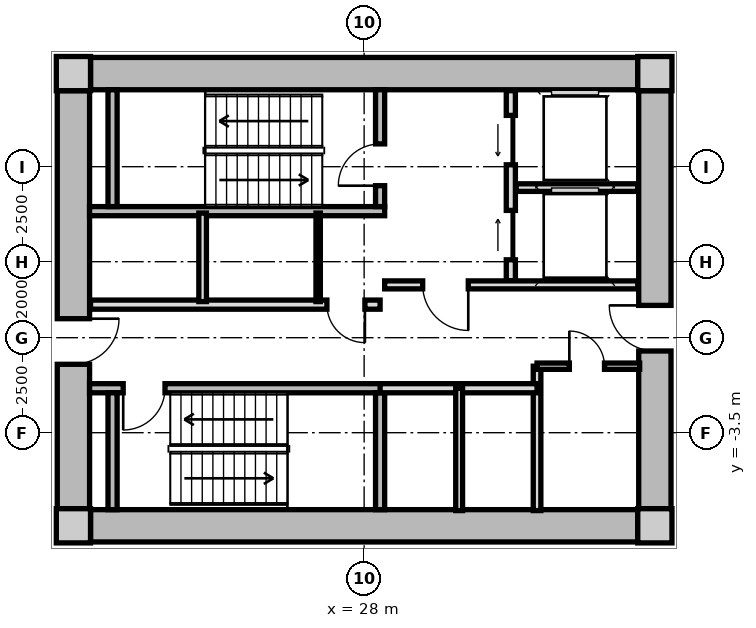
"""IFC4 building model, lengths in metres.
Left out: names, types, materials, properties, quantities, classifications, styles, units other than length and angle.
Written with IfcOpenShell. Run it as: python <this file> out.ifc"""

import sys

from ifc_helpers import new_model, si_unit, direction, frame, frame_2d, origin, origin_2d, place, context, subcontext, project, spatial, rectangle, extrude, source, transform, mapped, element, fill, save


model = new_model("IFC4")
c1 = context("Model", 3, precision=1e-05, world=origin(), true_north=direction((0.0, 1.0)))
c2 = subcontext(c1, "Body", "Model", "MODEL_VIEW")
j1 = project(units=[si_unit("LENGTHUNIT", "METRE"), si_unit("PLANEANGLEUNIT", "RADIAN")], contexts=[c1])
p1 = place(None, origin())
s1 = spatial("IfcSite", under=j1, at=p1, CompositionType="ELEMENT")
p2 = place(p1, origin())
s2 = spatial("IfcBuilding", under=s1, at=p2, CompositionType="ELEMENT")
p3 = place(p2, frame((0.0, 0.0, -8.4)))
s3 = spatial("IfcBuildingStorey", under=s2, at=p3, CompositionType="ELEMENT", Elevation=-8.4)
m1 = source(origin(), c2, "Body", "SweptSolid", [
    extrude(rectangle(XDim=0.9, YDim=0.9, at=origin_2d()), origin(), (0.0, 0.0, 1.0), 4.2),
])
for number, where, z_axis, x_axis in (
    (1, (20.35, -5.95, 0.0), (0.0, 0.0, 1.0), (1.0, 0.0, 0.0)),
    (2, (35.65, -5.95, 0.0), (0.0, 0.0, 1.0), (1.0, 0.0, 0.0)),
    (3, (35.65, 5.95, 0.0), (0.0, 0.0, 1.0), (1.0, 0.0, 0.0)),
    (4, (20.35, 5.95, 0.0), (0.0, 0.0, 1.0), (1.0, 0.0, 0.0)),
):
    element("IfcColumn", number, at=place(p3, frame(where, z_axis=z_axis, x_axis=x_axis)), inside=s3, PredefinedType="COLUMN", context=c2, shape_type="MappedRepresentation", body=[
        mapped(m1, transform((0.0, 0.0, 0.0), x_axis=(1.0, 0.0, 0.0), y_axis=(0.0, 1.0, 0.0), z_axis=(0.0, 0.0, 1.0), scale=1.0)),
    ])
m2 = source(origin(), c2, "Body", "SweptSolid", [
    extrude(rectangle(XDim=14.4, YDim=0.85, at=frame_2d((7.2, 0.0))), origin(), (0.0, 0.0, 1.0), 3.88),
])
for number, where, z_axis, x_axis in (
    (5, (20.8, 5.95, 0.0), (0.0, 0.0, 1.0), (1.0, 0.0, 0.0)),
    (6, (35.2, -5.95, 0.0), (0.0, 0.0, 1.0), (-1.0, 0.0, 0.0)),
):
    element("IfcWall", number, at=place(p3, frame(where, z_axis=z_axis, x_axis=x_axis)), inside=s3, PredefinedType="SHEAR", context=c2, shape_type="MappedRepresentation", body=[
        mapped(m2, transform((0.0, 0.0, 0.0), x_axis=(1.0, 0.0, 0.0), y_axis=(0.0, 1.0, 0.0), z_axis=(0.0, 0.0, 1.0), scale=1.0)),
    ])
m3 = source(origin(), c2, "Body", "SweptSolid", [
    extrude(rectangle(XDim=11.0, YDim=0.85, at=frame_2d((5.5, 0.0))), origin(), (0.0, 0.0, 1.0), 3.88),
])
p4 = place(p3, frame((20.35, -5.5, 0.0), z_axis=(0.0, 0.0, 1.0), x_axis=(0.0, 1.0, 0.0)))
e7 = element("IfcWall", 7, at=p4, inside=s3, PredefinedType="SHEAR", context=c2, shape_type="MappedRepresentation", body=[
    mapped(m3, transform((0.0, 0.0, 0.0), x_axis=(1.0, 0.0, 0.0), y_axis=(0.0, 1.0, 0.0), z_axis=(0.0, 0.0, 1.0), scale=1.0)),
])
p5 = place(p4, frame((3.8, 0.0, 0.0)))
e8 = element("IfcOpeningElement", 8, at=p5, cuts=e7, PredefinedType="OPENING", context=c2, shape_type="SweptSolid", body=[
    extrude(rectangle(XDim=1.2, YDim=2.15, at=frame_2d((0.6, 1.075))), frame((0.0, 0.435, 0.0), z_axis=(0.0, -1.0, 0.0), x_axis=(1.0, 0.0, 0.0)), (0.0, 0.0, 1.0), 0.87),
])
p6 = place(p3, frame((35.65, 5.5, 0.0), z_axis=(0.0, 0.0, 1.0), x_axis=(0.0, -1.0, 0.0)))
e9 = element("IfcWall", 9, at=p6, inside=s3, PredefinedType="SHEAR", context=c2, shape_type="MappedRepresentation", body=[
    mapped(m3, transform((0.0, 0.0, 0.0), x_axis=(1.0, 0.0, 0.0), y_axis=(0.0, 1.0, 0.0), z_axis=(0.0, 0.0, 1.0), scale=1.0)),
])
p7 = place(p6, frame((5.65, 0.0, 0.0)))
e10 = element("IfcOpeningElement", 10, at=p7, cuts=e9, PredefinedType="OPENING", context=c2, shape_type="SweptSolid", body=[
    extrude(rectangle(XDim=1.2, YDim=2.15, at=frame_2d((0.6, 1.075))), frame((0.0, 0.435, 0.0), z_axis=(0.0, -1.0, 0.0), x_axis=(1.0, 0.0, 0.0)), (0.0, 0.0, 1.0), 0.87),
])
m4 = source(origin(), c2, "Body", "SweptSolid", [
    extrude(rectangle(XDim=7.765, YDim=0.24, at=frame_2d((3.883, 0.0))), origin(), (0.0, 0.0, 1.0), 3.88),
])
p8 = place(p3, frame((20.775, 2.33, 0.0), z_axis=(0.0, 0.0, 1.0), x_axis=(1.0, 0.0, 0.0)))
e11 = element("IfcWall", 11, at=p8, inside=s3, PredefinedType="PARTITIONING", context=c2, shape_type="MappedRepresentation", body=[
    mapped(m4, transform((0.0, 0.0, 0.0), x_axis=(1.0, 0.0, 0.0), y_axis=(0.0, 1.0, 0.0), z_axis=(0.0, 0.0, 1.0), scale=1.0)),
])
m5 = source(origin(), c2, "Body", "SweptSolid", [
    extrude(rectangle(XDim=3.075, YDim=0.24, at=frame_2d((1.538, 0.0))), origin(), (0.0, 0.0, 1.0), 3.88),
])
p9 = place(p3, frame((21.38, 2.45, 0.0), z_axis=(0.0, 0.0, 1.0), x_axis=(0.0, 1.0, 0.0)))
e12 = element("IfcWall", 12, at=p9, inside=s3, PredefinedType="PARTITIONING", context=c2, shape_type="MappedRepresentation", body=[
    mapped(m5, transform((0.0, 0.0, 0.0), x_axis=(1.0, 0.0, 0.0), y_axis=(0.0, 1.0, 0.0), z_axis=(0.0, 0.0, 1.0), scale=1.0)),
])
p10 = place(p3, frame((28.42, 2.45, 0.0), z_axis=(0.0, 0.0, 1.0), x_axis=(0.0, 1.0, 0.0)))
e13 = element("IfcWall", 13, at=p10, inside=s3, PredefinedType="PARTITIONING", context=c2, shape_type="MappedRepresentation", body=[
    mapped(m5, transform((0.0, 0.0, 0.0), x_axis=(1.0, 0.0, 0.0), y_axis=(0.0, 1.0, 0.0), z_axis=(0.0, 0.0, 1.0), scale=1.0)),
])
p11 = place(p10, frame((0.55, 0.0, 0.0)))
e14 = element("IfcOpeningElement", 14, at=p11, cuts=e13, PredefinedType="OPENING", context=c2, shape_type="SweptSolid", body=[
    extrude(rectangle(XDim=1.1, YDim=2.15, at=frame_2d((0.55, 1.075))), frame((0.0, 0.13, 0.0), z_axis=(0.0, -1.0, 0.0), x_axis=(1.0, 0.0, 0.0)), (0.0, 0.0, 1.0), 0.26),
])
p12 = place(p3, frame((20.775, -2.33, 0.0), z_axis=(0.0, 0.0, 1.0), x_axis=(1.0, 0.0, 0.0)))
e15 = element("IfcWall", 15, at=p12, inside=s3, PredefinedType="PARTITIONING", context=c2, shape_type="MappedRepresentation", body=[
    mapped(m4, transform((0.0, 0.0, 0.0), x_axis=(1.0, 0.0, 0.0), y_axis=(0.0, 1.0, 0.0), z_axis=(0.0, 0.0, 1.0), scale=1.0)),
])
p13 = place(p12, frame((0.885, 0.0, 0.0)))
e16 = element("IfcOpeningElement", 16, at=p13, cuts=e15, PredefinedType="OPENING", context=c2, shape_type="SweptSolid", body=[
    extrude(rectangle(XDim=1.1, YDim=2.15, at=frame_2d((0.55, 1.075))), frame((0.0, 0.13, 0.0), z_axis=(0.0, -1.0, 0.0), x_axis=(1.0, 0.0, 0.0)), (0.0, 0.0, 1.0), 0.26),
])
for number, where, z_axis, x_axis in (
    (17, (21.38, -5.525, 0.0), (0.0, 0.0, 1.0), (0.0, 1.0, 0.0)),
    (18, (28.42, -5.525, 0.0), (0.0, 0.0, 1.0), (0.0, 1.0, 0.0)),
):
    element("IfcWall", number, at=place(p3, frame(where, z_axis=z_axis, x_axis=x_axis)), inside=s3, PredefinedType="PARTITIONING", context=c2, shape_type="MappedRepresentation", body=[
        mapped(m5, transform((0.0, 0.0, 0.0), x_axis=(1.0, 0.0, 0.0), y_axis=(0.0, 1.0, 0.0), z_axis=(0.0, 0.0, 1.0), scale=1.0)),
    ])
m6 = source(origin(), c2, "Body", "SweptSolid", [
    extrude(rectangle(XDim=5.0, YDim=0.24, at=frame_2d((2.5, 0.0))), origin(), (0.0, 0.0, 1.0), 3.865),
])
p14 = place(p3, frame((31.86, 0.5, 0.0), z_axis=(0.0, 0.0, 1.0), x_axis=(0.0, 1.0, 0.0)))
e19 = element("IfcWall", 19, at=p14, inside=s3, PredefinedType="PARTITIONING", context=c2, shape_type="MappedRepresentation", body=[
    mapped(m6, transform((0.0, 0.0, 0.0), x_axis=(1.0, 0.0, 0.0), y_axis=(0.0, 1.0, 0.0), z_axis=(0.0, 0.0, 1.0), scale=1.0)),
])
p15 = place(p14, frame((3.05, 0.0, 0.0)))
e20 = element("IfcOpeningElement", 20, at=p15, cuts=e19, PredefinedType="OPENING", context=c2, shape_type="SweptSolid", body=[
    extrude(rectangle(XDim=1.3, YDim=2.2, at=frame_2d((0.65, 1.1))), frame((0.0, 0.13, 0.0), z_axis=(0.0, -1.0, 0.0), x_axis=(1.0, 0.0, 0.0)), (0.0, 0.0, 1.0), 0.26),
])
p16 = place(p14, frame((0.55, 0.0, 0.0)))
e21 = element("IfcOpeningElement", 21, at=p16, cuts=e19, PredefinedType="OPENING", context=c2, shape_type="SweptSolid", body=[
    extrude(rectangle(XDim=1.3, YDim=2.2, at=frame_2d((0.65, 1.1))), frame((0.0, 0.13, 0.0), z_axis=(0.0, -1.0, 0.0), x_axis=(1.0, 0.0, 0.0)), (0.0, 0.0, 1.0), 0.26),
])
m7 = source(origin(), c2, "Body", "SweptSolid", [
    extrude(rectangle(XDim=3.2, YDim=0.2, at=frame_2d((1.6, 0.0))), origin(), (0.0, 0.0, 1.0), 3.865),
])
p17 = place(p3, frame((32.0, 2.95, 0.0), z_axis=(0.0, 0.0, 1.0), x_axis=(1.0, 0.0, 0.0)))
e22 = element("IfcWall", 22, at=p17, inside=s3, PredefinedType="PARTITIONING", context=c2, shape_type="MappedRepresentation", body=[
    mapped(m7, transform((0.0, 0.0, 0.0), x_axis=(1.0, 0.0, 0.0), y_axis=(0.0, 1.0, 0.0), z_axis=(0.0, 0.0, 1.0), scale=1.0)),
])
m8 = source(origin(), c2, "Body", "SweptSolid", [
    extrude(rectangle(XDim=6.66, YDim=0.21, at=frame_2d((3.33, 0.0))), origin(), (0.0, 0.0, 1.0), 3.865),
])
p18 = place(p3, frame((28.54, 0.39, 0.0), z_axis=(0.0, 0.0, 1.0), x_axis=(1.0, 0.0, 0.0)))
e23 = element("IfcWall", 23, at=p18, inside=s3, PredefinedType="PARTITIONING", context=c2, shape_type="MappedRepresentation", body=[
    mapped(m8, transform((0.0, 0.0, 0.0), x_axis=(1.0, 0.0, 0.0), y_axis=(0.0, 1.0, 0.0), z_axis=(0.0, 0.0, 1.0), scale=1.0)),
])
p19 = place(p18, frame((1.0, 0.0, 0.0)))
e24 = element("IfcOpeningElement", 24, at=p19, cuts=e23, PredefinedType="OPENING", context=c2, shape_type="SweptSolid", body=[
    extrude(rectangle(XDim=1.2, YDim=2.15, at=frame_2d((0.6, 1.075))), frame((0.0, 0.115, 0.0), z_axis=(0.0, -1.0, 0.0), x_axis=(1.0, 0.0, 0.0)), (0.0, 0.0, 1.0), 0.23),
])
m9 = source(origin(), c2, "Body", "SweptSolid", [
    extrude(rectangle(XDim=7.62, YDim=0.24, at=frame_2d((3.81, 0.0))), origin(), (0.0, 0.0, 1.0), 3.865),
])
p20 = place(p3, frame((20.8, -0.13, 0.0), z_axis=(0.0, 0.0, 1.0), x_axis=(1.0, 0.0, 0.0)))
e25 = element("IfcWall", 25, at=p20, inside=s3, PredefinedType="PARTITIONING", context=c2, shape_type="MappedRepresentation", body=[
    mapped(m9, transform((0.0, 0.0, 0.0), x_axis=(1.0, 0.0, 0.0), y_axis=(0.0, 1.0, 0.0), z_axis=(0.0, 0.0, 1.0), scale=1.0)),
])
p21 = place(p20, frame((6.22, 0.0, 0.0)))
e26 = element("IfcOpeningElement", 26, at=p21, cuts=e25, PredefinedType="OPENING", context=c2, shape_type="SweptSolid", body=[
    extrude(rectangle(XDim=1.0, YDim=2.1, at=frame_2d((0.5, 1.05))), frame((0.0, 0.13, 0.0), z_axis=(0.0, -1.0, 0.0), x_axis=(1.0, 0.0, 0.0)), (0.0, 0.0, 1.0), 0.26),
])
m10 = source(origin(), c2, "Body", "SweptSolid", [
    extrude(rectangle(XDim=2.33, YDim=0.115, at=frame_2d((1.165, 0.0))), origin(), (0.0, 0.0, 1.0), 3.865),
])
p22 = place(p3, frame((26.79, -0.05, 0.0), z_axis=(0.0, 0.0, 1.0), x_axis=(0.0, 1.0, 0.0)))
e27 = element("IfcWall", 27, at=p22, inside=s3, PredefinedType="PARTITIONING", context=c2, shape_type="MappedRepresentation", body=[
    mapped(m10, transform((0.0, 0.0, 0.0), x_axis=(1.0, 0.0, 0.0), y_axis=(0.0, 1.0, 0.0), z_axis=(0.0, 0.0, 1.0), scale=1.0)),
])
m11 = source(origin(), c2, "Body", "SweptSolid", [
    extrude(rectangle(XDim=2.33, YDim=0.2, at=frame_2d((1.165, 0.0))), origin(), (0.0, 0.0, 1.0), 3.865),
])
p23 = place(p3, frame((23.75, -0.05, 0.0), z_axis=(0.0, 0.0, 1.0), x_axis=(0.0, 1.0, 0.0)))
e28 = element("IfcWall", 28, at=p23, inside=s3, PredefinedType="PARTITIONING", context=c2, shape_type="MappedRepresentation", body=[
    mapped(m11, transform((0.0, 0.0, 0.0), x_axis=(1.0, 0.0, 0.0), y_axis=(0.0, 1.0, 0.0), z_axis=(0.0, 0.0, 1.0), scale=1.0)),
])
m12 = source(origin(), c2, "Body", "SweptSolid", [
    extrude(rectangle(XDim=3.8, YDim=0.2, at=frame_2d((1.9, 0.0))), origin(), (0.0, 0.0, 1.0), 3.865),
])
p24 = place(p3, frame((32.55, -5.55, 0.0), z_axis=(0.0, 0.0, 1.0), x_axis=(0.0, 1.0, 0.0)))
e29 = element("IfcWall", 29, at=p24, inside=s3, PredefinedType="PARTITIONING", context=c2, shape_type="MappedRepresentation", body=[
    mapped(m12, transform((0.0, 0.0, 0.0), x_axis=(1.0, 0.0, 0.0), y_axis=(0.0, 1.0, 0.0), z_axis=(0.0, 0.0, 1.0), scale=1.0)),
])
m13 = source(origin(), c2, "Body", "SweptSolid", [
    extrude(rectangle(XDim=4.13, YDim=0.24, at=frame_2d((2.065, 0.0))), origin(), (0.0, 0.0, 1.0), 3.865),
])
p25 = place(p3, frame((28.42, -2.33, 0.0), z_axis=(0.0, 0.0, 1.0), x_axis=(1.0, 0.0, 0.0)))
e30 = element("IfcWall", 30, at=p25, inside=s3, PredefinedType="PARTITIONING", context=c2, shape_type="MappedRepresentation", body=[
    mapped(m13, transform((0.0, 0.0, 0.0), x_axis=(1.0, 0.0, 0.0), y_axis=(0.0, 1.0, 0.0), z_axis=(0.0, 0.0, 1.0), scale=1.0)),
])
m14 = source(origin(), c2, "Body", "SweptSolid", [
    extrude(rectangle(XDim=3.22, YDim=0.18, at=frame_2d((1.61, 0.0))), origin(), (0.0, 0.0, 1.0), 3.865),
])
p26 = place(p3, frame((30.5, -5.55, 0.0), z_axis=(0.0, 0.0, 1.0), x_axis=(0.0, 1.0, 0.0)))
e31 = element("IfcWall", 31, at=p26, inside=s3, PredefinedType="PARTITIONING", context=c2, shape_type="MappedRepresentation", body=[
    mapped(m14, transform((0.0, 0.0, 0.0), x_axis=(1.0, 0.0, 0.0), y_axis=(0.0, 1.0, 0.0), z_axis=(0.0, 0.0, 1.0), scale=1.0)),
])
m15 = source(origin(), c2, "Body", "SweptSolid", [
    extrude(rectangle(XDim=2.7, YDim=0.165, at=frame_2d((1.35, 0.0))), origin(), (0.0, 0.0, 1.0), 3.865),
])
p27 = place(p3, frame((32.55, -1.75, 0.0), z_axis=(0.0, 0.0, 1.0), x_axis=(1.0, 0.0, 0.0)))
e32 = element("IfcWall", 32, at=p27, inside=s3, PredefinedType="PARTITIONING", context=c2, shape_type="MappedRepresentation", body=[
    mapped(m15, transform((0.0, 0.0, 0.0), x_axis=(1.0, 0.0, 0.0), y_axis=(0.0, 1.0, 0.0), z_axis=(0.0, 0.0, 1.0), scale=1.0)),
])
p28 = place(p27, frame((0.85, 0.0, 0.0)))
e33 = element("IfcOpeningElement", 33, at=p28, cuts=e32, PredefinedType="OPENING", context=c2, shape_type="SweptSolid", body=[
    extrude(rectangle(XDim=0.925, YDim=2.1, at=frame_2d((0.462, 1.05))), frame((0.0, 0.093, 0.0), z_axis=(0.0, -1.0, 0.0), x_axis=(1.0, 0.0, 0.0)), (0.0, 0.0, 1.0), 0.185),
])
m16 = source(origin(), c2, "Body", "SweptSolid", [
    extrude(rectangle(XDim=1.1, YDim=2.15, at=frame_2d((0.55, 1.075))), frame((0.0, 0.025, 0.0), z_axis=(0.0, -1.0, 0.0), x_axis=(1.0, 0.0, 0.0)), (0.0, 0.0, 1.0), 0.05),
])
p29 = place(p11, origin())
e34 = element("IfcDoor", 34, at=p29, inside=s3, OperationType="SINGLE_SWING_LEFT", PredefinedType="DOOR", context=c2, shape_type="MappedRepresentation", body=[
    mapped(m16, transform((0.0, 0.0, 0.0), x_axis=(1.0, 0.0, 0.0), y_axis=(0.0, 1.0, 0.0), z_axis=(0.0, 0.0, 1.0), scale=1.0)),
])
fill(e14, e34)
p30 = place(p13, frame((1.1, 0.0, 0.0), z_axis=(0.0, 0.0, 1.0), x_axis=(-1.0, 0.0, 0.0)))
e35 = element("IfcDoor", 35, at=p30, inside=s3, OperationType="SINGLE_SWING_RIGHT", PredefinedType="DOOR", context=c2, shape_type="MappedRepresentation", body=[
    mapped(m16, transform((0.0, 0.0, 0.0), x_axis=(1.0, 0.0, 0.0), y_axis=(0.0, 1.0, 0.0), z_axis=(0.0, 0.0, 1.0), scale=1.0)),
])
fill(e16, e35)
m17 = source(origin(), c2, "Body", "SweptSolid", [
    extrude(rectangle(XDim=1.3, YDim=2.2, at=frame_2d((0.65, 1.1))), frame((0.0, 0.025, 0.0), z_axis=(0.0, -1.0, 0.0), x_axis=(1.0, 0.0, 0.0)), (0.0, 0.0, 1.0), 0.05),
])
p31 = place(p15, origin())
e36 = element("IfcDoor", 36, at=p31, inside=s3, OperationType="SLIDING_TO_LEFT", PredefinedType="DOOR", context=c2, shape_type="MappedRepresentation", body=[
    mapped(m17, transform((0.0, 0.0, 0.0), x_axis=(1.0, 0.0, 0.0), y_axis=(0.0, 1.0, 0.0), z_axis=(0.0, 0.0, 1.0), scale=1.0)),
])
fill(e20, e36)
p32 = place(p16, origin())
e37 = element("IfcDoor", 37, at=p32, inside=s3, OperationType="SLIDING_TO_RIGHT", PredefinedType="DOOR", context=c2, shape_type="MappedRepresentation", body=[
    mapped(m17, transform((0.0, 0.0, 0.0), x_axis=(1.0, 0.0, 0.0), y_axis=(0.0, 1.0, 0.0), z_axis=(0.0, 0.0, 1.0), scale=1.0)),
])
fill(e21, e37)
m18 = source(origin(), c2, "Body", "SweptSolid", [
    extrude(rectangle(XDim=1.2, YDim=2.15, at=frame_2d((0.6, 1.075))), frame((0.0, 0.025, 0.0), z_axis=(0.0, -1.0, 0.0), x_axis=(1.0, 0.0, 0.0)), (0.0, 0.0, 1.0), 0.05),
])
p33 = place(p19, frame((1.2, 0.0, 0.0), z_axis=(0.0, 0.0, 1.0), x_axis=(-1.0, 0.0, 0.0)))
e38 = element("IfcDoor", 38, at=p33, inside=s3, OperationType="SINGLE_SWING_LEFT", PredefinedType="DOOR", context=c2, shape_type="MappedRepresentation", body=[
    mapped(m18, transform((0.0, 0.0, 0.0), x_axis=(1.0, 0.0, 0.0), y_axis=(0.0, 1.0, 0.0), z_axis=(0.0, 0.0, 1.0), scale=1.0)),
])
fill(e24, e38)
p34 = place(p5, frame((1.2, 0.0, 0.0), z_axis=(0.0, 0.0, 1.0), x_axis=(-1.0, 0.0, 0.0)))
e39 = element("IfcDoor", 39, at=p34, inside=s3, OperationType="SINGLE_SWING_LEFT", PredefinedType="DOOR", context=c2, shape_type="MappedRepresentation", body=[
    mapped(m18, transform((0.0, 0.0, 0.0), x_axis=(1.0, 0.0, 0.0), y_axis=(0.0, 1.0, 0.0), z_axis=(0.0, 0.0, 1.0), scale=1.0)),
])
fill(e8, e39)
p35 = place(p7, frame((1.2, 0.0, 0.0), z_axis=(0.0, 0.0, 1.0), x_axis=(-1.0, 0.0, 0.0)))
e40 = element("IfcDoor", 40, at=p35, inside=s3, OperationType="SINGLE_SWING_RIGHT", PredefinedType="DOOR", context=c2, shape_type="MappedRepresentation", body=[
    mapped(m18, transform((0.0, 0.0, 0.0), x_axis=(1.0, 0.0, 0.0), y_axis=(0.0, 1.0, 0.0), z_axis=(0.0, 0.0, 1.0), scale=1.0)),
])
fill(e10, e40)
m19 = source(origin(), c2, "Body", "SweptSolid", [
    extrude(rectangle(XDim=1.0, YDim=2.1, at=frame_2d((0.5, 1.05))), frame((0.0, 0.025, 0.0), z_axis=(0.0, -1.0, 0.0), x_axis=(1.0, 0.0, 0.0)), (0.0, 0.0, 1.0), 0.05),
])
p36 = place(p21, frame((1.0, 0.0, 0.0), z_axis=(0.0, 0.0, 1.0), x_axis=(-1.0, 0.0, 0.0)))
e41 = element("IfcDoor", 41, at=p36, inside=s3, OperationType="SINGLE_SWING_LEFT", PredefinedType="DOOR", context=c2, shape_type="MappedRepresentation", body=[
    mapped(m19, transform((0.0, 0.0, 0.0), x_axis=(1.0, 0.0, 0.0), y_axis=(0.0, 1.0, 0.0), z_axis=(0.0, 0.0, 1.0), scale=1.0)),
])
fill(e26, e41)
m20 = source(origin(), c2, "Body", "SweptSolid", [
    extrude(rectangle(XDim=0.925, YDim=2.1, at=frame_2d((0.462, 1.05))), frame((0.0, 0.025, 0.0), z_axis=(0.0, -1.0, 0.0), x_axis=(1.0, 0.0, 0.0)), (0.0, 0.0, 1.0), 0.05),
])
p37 = place(p28, origin())
e42 = element("IfcDoor", 42, at=p37, inside=s3, OperationType="SINGLE_SWING_LEFT", PredefinedType="DOOR", context=c2, shape_type="MappedRepresentation", body=[
    mapped(m20, transform((0.0, 0.0, 0.0), x_axis=(1.0, 0.0, 0.0), y_axis=(0.0, 1.0, 0.0), z_axis=(0.0, 0.0, 1.0), scale=1.0)),
])
fill(e33, e42)
save(model, sys.argv[1])
